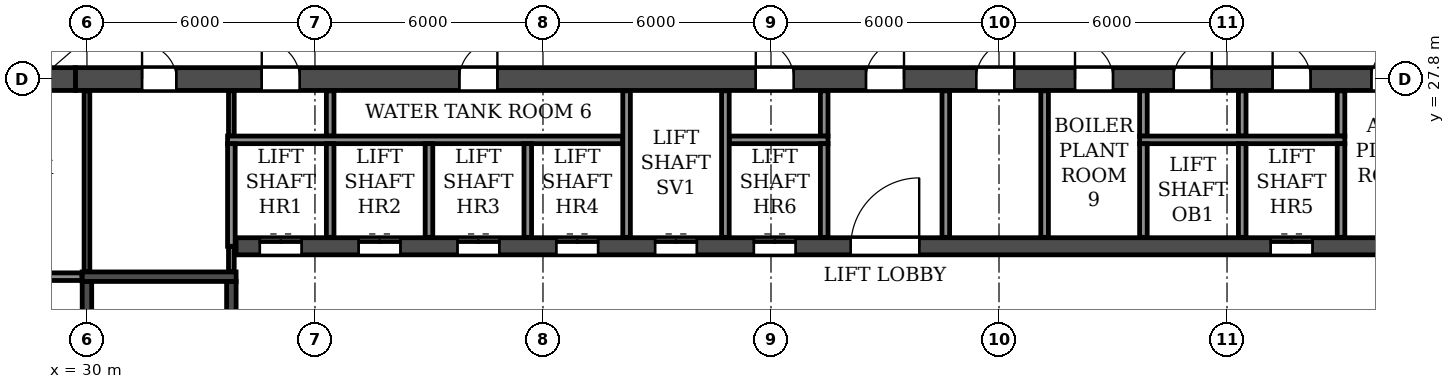
"""IFC4 building model, lengths in metres.
Left out: names, types, materials, properties, quantities, classifications, styles, units other than length and angle.
Written with IfcOpenShell. Run it as: python <this file> out.ifc"""

import sys

from ifc_helpers import new_model, si_unit, direction, frame, frame_2d, origin, place, context, subcontext, project, spatial, rectangle, extrude, element, fill, save


model = new_model("IFC4")
c1 = context("Model", 3, precision=1e-05, world=origin(), true_north=direction((0.0, 1.0)))
c2 = subcontext(c1, "Body", "Model", "MODEL_VIEW")
j1 = project(units=[si_unit("LENGTHUNIT", "METRE"), si_unit("PLANEANGLEUNIT", "RADIAN")], contexts=[c1])
p1 = place(None, origin())
s1 = spatial("IfcSite", under=j1, at=p1, CompositionType="ELEMENT")
p2 = place(p1, origin())
s2 = spatial("IfcBuilding", under=s1, at=p2, CompositionType="ELEMENT")
p3 = place(p2, frame((0.0, 0.0, 165.3)))
s3 = spatial("IfcBuildingStorey", under=s2, at=p3, CompositionType="ELEMENT", Elevation=165.3)
p4 = place(p3, frame((24.9, 27.8, 0.0), z_axis=(0.0, 0.0, 1.0), x_axis=(1.0, 0.0, 0.0)))
e1 = element("IfcWall", 1, at=p4, inside=s3, PredefinedType="SHEAR", context=c2, shape_type="SweptSolid", body=[
    extrude(rectangle(XDim=4.8, YDim=0.6, at=frame_2d((2.4, 0.0))), origin(), (0.0, 0.0, 1.0), 6.38),
])
p5 = place(p4, frame((1.9, 0.0, 0.0)))
e2 = element("IfcOpeningElement", 2, at=p5, cuts=e1, PredefinedType="OPENING", context=c2, shape_type="SweptSolid", body=[
    extrude(rectangle(XDim=1.0, YDim=2.1, at=frame_2d((0.5, 1.05))), frame((0.0, 0.31, 0.0), z_axis=(0.0, -1.0, 0.0), x_axis=(1.0, 0.0, 0.0)), (0.0, 0.0, 1.0), 0.62),
])
p6 = place(p3, frame((29.7, 27.8, 0.0), z_axis=(0.0, 0.0, 1.0), x_axis=(1.0, 0.0, 0.0)))
e3 = element("IfcWall", 3, at=p6, inside=s3, PredefinedType="SOLIDWALL", context=c2, shape_type="SweptSolid", body=[
    extrude(rectangle(XDim=42.6, YDim=0.6, at=frame_2d((21.3, 0.0))), origin(), (0.0, 0.0, 1.0), 6.38),
])
p7 = place(p6, frame((1.75, 0.0, 0.0)))
e4 = element("IfcOpeningElement", 4, at=p7, cuts=e3, PredefinedType="OPENING", context=c2, shape_type="SweptSolid", body=[
    extrude(rectangle(XDim=0.9, YDim=2.1, at=frame_2d((0.45, 1.05))), frame((0.0, 0.31, 0.0), z_axis=(0.0, -1.0, 0.0), x_axis=(1.0, 0.0, 0.0)), (0.0, 0.0, 1.0), 0.62),
])
p8 = place(p6, frame((4.9, 0.0, 0.0)))
e5 = element("IfcOpeningElement", 5, at=p8, cuts=e3, PredefinedType="OPENING", context=c2, shape_type="SweptSolid", body=[
    extrude(rectangle(XDim=1.0, YDim=2.1, at=frame_2d((0.5, 1.05))), frame((0.0, 0.31, 0.0), z_axis=(0.0, -1.0, 0.0), x_axis=(1.0, 0.0, 0.0)), (0.0, 0.0, 1.0), 0.62),
])
p9 = place(p6, frame((10.1, 0.0, 0.0)))
e6 = element("IfcOpeningElement", 6, at=p9, cuts=e3, PredefinedType="OPENING", context=c2, shape_type="SweptSolid", body=[
    extrude(rectangle(XDim=1.0, YDim=2.1, at=frame_2d((0.5, 1.05))), frame((0.0, 0.31, 0.0), z_axis=(0.0, -1.0, 0.0), x_axis=(1.0, 0.0, 0.0)), (0.0, 0.0, 1.0), 0.62),
])
p10 = place(p6, frame((17.9, 0.0, 0.0)))
e7 = element("IfcOpeningElement", 7, at=p10, cuts=e3, PredefinedType="OPENING", context=c2, shape_type="SweptSolid", body=[
    extrude(rectangle(XDim=1.0, YDim=2.1, at=frame_2d((0.5, 1.05))), frame((0.0, 0.31, 0.0), z_axis=(0.0, -1.0, 0.0), x_axis=(1.0, 0.0, 0.0)), (0.0, 0.0, 1.0), 0.62),
])
p11 = place(p6, frame((20.8, 0.0, 0.0)))
e8 = element("IfcOpeningElement", 8, at=p11, cuts=e3, PredefinedType="OPENING", context=c2, shape_type="SweptSolid", body=[
    extrude(rectangle(XDim=1.0, YDim=2.1, at=frame_2d((0.5, 1.05))), frame((0.0, 0.31, 0.0), z_axis=(0.0, -1.0, 0.0), x_axis=(1.0, 0.0, 0.0)), (0.0, 0.0, 1.0), 0.62),
])
p12 = place(p6, frame((23.7, 0.0, 0.0)))
e9 = element("IfcOpeningElement", 9, at=p12, cuts=e3, PredefinedType="OPENING", context=c2, shape_type="SweptSolid", body=[
    extrude(rectangle(XDim=1.0, YDim=2.1, at=frame_2d((0.5, 1.05))), frame((0.0, 0.31, 0.0), z_axis=(0.0, -1.0, 0.0), x_axis=(1.0, 0.0, 0.0)), (0.0, 0.0, 1.0), 0.62),
])
p13 = place(p6, frame((26.3, 0.0, 0.0)))
e10 = element("IfcOpeningElement", 10, at=p13, cuts=e3, PredefinedType="OPENING", context=c2, shape_type="SweptSolid", body=[
    extrude(rectangle(XDim=1.0, YDim=2.1, at=frame_2d((0.5, 1.05))), frame((0.0, 0.31, 0.0), z_axis=(0.0, -1.0, 0.0), x_axis=(1.0, 0.0, 0.0)), (0.0, 0.0, 1.0), 0.62),
])
p14 = place(p6, frame((28.9, 0.0, 0.0)))
e11 = element("IfcOpeningElement", 11, at=p14, cuts=e3, PredefinedType="OPENING", context=c2, shape_type="SweptSolid", body=[
    extrude(rectangle(XDim=1.0, YDim=2.1, at=frame_2d((0.5, 1.05))), frame((0.0, 0.31, 0.0), z_axis=(0.0, -1.0, 0.0), x_axis=(1.0, 0.0, 0.0)), (0.0, 0.0, 1.0), 0.62),
])
p15 = place(p6, frame((31.5, 0.0, 0.0)))
e12 = element("IfcOpeningElement", 12, at=p15, cuts=e3, PredefinedType="OPENING", context=c2, shape_type="SweptSolid", body=[
    extrude(rectangle(XDim=1.0, YDim=2.1, at=frame_2d((0.5, 1.05))), frame((0.0, 0.31, 0.0), z_axis=(0.0, -1.0, 0.0), x_axis=(1.0, 0.0, 0.0)), (0.0, 0.0, 1.0), 0.62),
])
p16 = place(p6, frame((34.1, 0.0, 0.0)))
e13 = element("IfcOpeningElement", 13, at=p16, cuts=e3, PredefinedType="OPENING", context=c2, shape_type="SweptSolid", body=[
    extrude(rectangle(XDim=1.0, YDim=2.1, at=frame_2d((0.5, 1.05))), frame((0.0, 0.31, 0.0), z_axis=(0.0, -1.0, 0.0), x_axis=(1.0, 0.0, 0.0)), (0.0, 0.0, 1.0), 0.62),
])
p17 = place(p6, frame((36.7, 0.0, 0.0)))
e14 = element("IfcOpeningElement", 14, at=p17, cuts=e3, PredefinedType="OPENING", context=c2, shape_type="SweptSolid", body=[
    extrude(rectangle(XDim=1.0, YDim=2.1, at=frame_2d((0.5, 1.05))), frame((0.0, 0.31, 0.0), z_axis=(0.0, -1.0, 0.0), x_axis=(1.0, 0.0, 0.0)), (0.0, 0.0, 1.0), 0.62),
])
p18 = place(p6, frame((39.95, 0.0, 0.0)))
e15 = element("IfcOpeningElement", 15, at=p18, cuts=e3, PredefinedType="OPENING", context=c2, shape_type="SweptSolid", body=[
    extrude(rectangle(XDim=0.9, YDim=2.1, at=frame_2d((0.45, 1.05))), frame((0.0, 0.31, 0.0), z_axis=(0.0, -1.0, 0.0), x_axis=(1.0, 0.0, 0.0)), (0.0, 0.0, 1.0), 0.62),
])
p19 = place(p3, frame((33.925, 23.4, 0.0), z_axis=(0.0, 0.0, 1.0), x_axis=(1.0, 0.0, 0.0)))
e16 = element("IfcWall", 16, at=p19, inside=s3, PredefinedType="SOLIDWALL", context=c2, shape_type="SweptSolid", body=[
    extrude(rectangle(XDim=34.15, YDim=0.45, at=frame_2d((17.075, 0.0))), origin(), (0.0, 0.0, 1.0), 6.38),
])
p20 = place(p19, frame((16.175, 0.0, 0.0)))
e17 = element("IfcOpeningElement", 17, at=p20, cuts=e16, PredefinedType="OPENING", context=c2, shape_type="SweptSolid", body=[
    extrude(rectangle(XDim=1.8, YDim=2.1, at=frame_2d((0.9, 1.05))), frame((0.0, 0.235, 0.0), z_axis=(0.0, -1.0, 0.0), x_axis=(1.0, 0.0, 0.0)), (0.0, 0.0, 1.0), 0.47),
])
p21 = place(p19, frame((0.625, 0.0, 0.0)))
e18 = element("IfcOpeningElement", 18, at=p21, cuts=e16, PredefinedType="OPENING", context=c2, shape_type="SweptSolid", body=[
    extrude(rectangle(XDim=1.1, YDim=2.1, at=frame_2d((0.55, 1.05))), frame((0.0, 0.235, 0.0), z_axis=(0.0, -1.0, 0.0), x_axis=(1.0, 0.0, 0.0)), (0.0, 0.0, 1.0), 0.47),
])
p22 = place(p19, frame((3.225, 0.0, 0.0)))
e19 = element("IfcOpeningElement", 19, at=p22, cuts=e16, PredefinedType="OPENING", context=c2, shape_type="SweptSolid", body=[
    extrude(rectangle(XDim=1.1, YDim=2.1, at=frame_2d((0.55, 1.05))), frame((0.0, 0.235, 0.0), z_axis=(0.0, -1.0, 0.0), x_axis=(1.0, 0.0, 0.0)), (0.0, 0.0, 1.0), 0.47),
])
p23 = place(p19, frame((5.825, 0.0, 0.0)))
e20 = element("IfcOpeningElement", 20, at=p23, cuts=e16, PredefinedType="OPENING", context=c2, shape_type="SweptSolid", body=[
    extrude(rectangle(XDim=1.1, YDim=2.1, at=frame_2d((0.55, 1.05))), frame((0.0, 0.235, 0.0), z_axis=(0.0, -1.0, 0.0), x_axis=(1.0, 0.0, 0.0)), (0.0, 0.0, 1.0), 0.47),
])
p24 = place(p19, frame((8.425, 0.0, 0.0)))
e21 = element("IfcOpeningElement", 21, at=p24, cuts=e16, PredefinedType="OPENING", context=c2, shape_type="SweptSolid", body=[
    extrude(rectangle(XDim=1.1, YDim=2.1, at=frame_2d((0.55, 1.05))), frame((0.0, 0.235, 0.0), z_axis=(0.0, -1.0, 0.0), x_axis=(1.0, 0.0, 0.0)), (0.0, 0.0, 1.0), 0.47),
])
p25 = place(p19, frame((11.025, 0.0, 0.0)))
e22 = element("IfcOpeningElement", 22, at=p25, cuts=e16, PredefinedType="OPENING", context=c2, shape_type="SweptSolid", body=[
    extrude(rectangle(XDim=1.1, YDim=2.1, at=frame_2d((0.55, 1.05))), frame((0.0, 0.235, 0.0), z_axis=(0.0, -1.0, 0.0), x_axis=(1.0, 0.0, 0.0)), (0.0, 0.0, 1.0), 0.47),
])
p26 = place(p19, frame((13.625, 0.0, 0.0)))
e23 = element("IfcOpeningElement", 23, at=p26, cuts=e16, PredefinedType="OPENING", context=c2, shape_type="SweptSolid", body=[
    extrude(rectangle(XDim=1.1, YDim=2.1, at=frame_2d((0.55, 1.05))), frame((0.0, 0.235, 0.0), z_axis=(0.0, -1.0, 0.0), x_axis=(1.0, 0.0, 0.0)), (0.0, 0.0, 1.0), 0.47),
])
p27 = place(p19, frame((27.225, 0.0, 0.0)))
e24 = element("IfcOpeningElement", 24, at=p27, cuts=e16, PredefinedType="OPENING", context=c2, shape_type="SweptSolid", body=[
    extrude(rectangle(XDim=1.1, YDim=2.1, at=frame_2d((0.55, 1.05))), frame((0.0, 0.235, 0.0), z_axis=(0.0, -1.0, 0.0), x_axis=(1.0, 0.0, 0.0)), (0.0, 0.0, 1.0), 0.47),
])
p28 = place(p3, frame((30.0, 14.825, 0.0), z_axis=(0.0, 0.0, 1.0), x_axis=(0.0, 1.0, 0.0)))
e25 = element("IfcWall", 25, at=p28, inside=s3, PredefinedType="SOLIDWALL", context=c2, shape_type="SweptSolid", body=[
    extrude(rectangle(XDim=7.65, YDim=0.25, at=frame_2d((3.825, 0.0))), origin(), (0.0, 0.0, 1.0), 6.38),
])
p29 = place(p3, frame((33.8, 14.825, 0.0), z_axis=(0.0, 0.0, 1.0), x_axis=(0.0, 1.0, 0.0)))
e26 = element("IfcWall", 26, at=p29, inside=s3, PredefinedType="SOLIDWALL", context=c2, shape_type="SweptSolid", body=[
    extrude(rectangle(XDim=7.65, YDim=0.25, at=frame_2d((3.825, 0.0))), origin(), (0.0, 0.0, 1.0), 6.38),
])
p30 = place(p29, frame((0.475, 0.0, 0.0)))
e27 = element("IfcOpeningElement", 27, at=p30, cuts=e26, PredefinedType="OPENING", context=c2, shape_type="SweptSolid", body=[
    extrude(rectangle(XDim=1.0, YDim=2.1, at=frame_2d((0.5, 1.05))), frame((0.0, 0.135, 0.0), z_axis=(0.0, -1.0, 0.0), x_axis=(1.0, 0.0, 0.0)), (0.0, 0.0, 1.0), 0.27),
])
p31 = place(p3, frame((29.875, 22.6, 0.0), z_axis=(0.0, 0.0, 1.0), x_axis=(1.0, 0.0, 0.0)))
e28 = element("IfcWall", 28, at=p31, inside=s3, PredefinedType="SOLIDWALL", context=c2, shape_type="SweptSolid", body=[
    extrude(rectangle(XDim=4.05, YDim=0.25, at=frame_2d((2.025, 0.0))), origin(), (0.0, 0.0, 1.0), 6.38),
])
for number, where, z_axis, x_axis in (
    (29, (36.4, 26.3, 0.0), (0.0, 0.0, 1.0), (0.0, 1.0, 0.0)),
    (30, (49.4, 26.3, 0.0), (0.0, 0.0, 1.0), (0.0, 1.0, 0.0)),
):
    element("IfcWall", number, at=place(p3, frame(where, z_axis=z_axis, x_axis=x_axis)), inside=s3, PredefinedType="PARTITIONING", context=c2, shape_type="SweptSolid", body=[
        extrude(rectangle(XDim=1.19, YDim=0.2, at=frame_2d((0.595, 0.0))), origin(), (0.0, 0.0, 1.0), 6.38),
    ])
for number, where, z_axis, x_axis in (
    (31, (52.6, 23.635, 0.0), (0.0, 0.0, 1.0), (0.0, 1.0, 0.0)),
    (32, (55.2, 23.635, 0.0), (0.0, 0.0, 1.0), (0.0, 1.0, 0.0)),
):
    element("IfcWall", number, at=place(p3, frame(where, z_axis=z_axis, x_axis=x_axis)), inside=s3, PredefinedType="PARTITIONING", context=c2, shape_type="SweptSolid", body=[
        extrude(rectangle(XDim=3.855, YDim=0.2, at=frame_2d((1.927, 0.0))), origin(), (0.0, 0.0, 1.0), 6.38),
    ])
for number, where, z_axis, x_axis in (
    (33, (57.8, 26.3, 0.0), (0.0, 0.0, 1.0), (0.0, 1.0, 0.0)),
    (34, (60.4, 26.3, 0.0), (0.0, 0.0, 1.0), (0.0, 1.0, 0.0)),
    (35, (63.0, 26.3, 0.0), (0.0, 0.0, 1.0), (0.0, 1.0, 0.0)),
):
    element("IfcWall", number, at=place(p3, frame(where, z_axis=z_axis, x_axis=x_axis)), inside=s3, PredefinedType="PARTITIONING", context=c2, shape_type="SweptSolid", body=[
        extrude(rectangle(XDim=1.19, YDim=0.2, at=frame_2d((0.595, 0.0))), origin(), (0.0, 0.0, 1.0), 6.38),
    ])
p32 = place(p3, frame((24.735, 22.6, 0.0), z_axis=(0.0, 0.0, 1.0), x_axis=(1.0, 0.0, 0.0)))
e36 = element("IfcWall", 36, at=p32, inside=s3, PredefinedType="PARTITIONING", context=c2, shape_type="SweptSolid", body=[
    extrude(rectangle(XDim=5.13, YDim=0.2, at=frame_2d((2.565, 0.0))), origin(), (0.0, 0.0, 1.0), 6.38),
])
p33 = place(p3, frame((30.0, 22.735, 0.0), z_axis=(0.0, 0.0, 1.0), x_axis=(0.0, 1.0, 0.0)))
e37 = element("IfcWall", 37, at=p33, inside=s3, PredefinedType="PARTITIONING", context=c2, shape_type="SweptSolid", body=[
    extrude(rectangle(XDim=4.755, YDim=0.15, at=frame_2d((2.377, 0.0))), origin(), (0.0, 0.0, 1.0), 6.38),
])
p34 = place(p3, frame((33.8, 22.735, 0.0), z_axis=(0.0, 0.0, 1.0), x_axis=(0.0, 1.0, 0.0)))
e38 = element("IfcWall", 38, at=p34, inside=s3, PredefinedType="PARTITIONING", context=c2, shape_type="SweptSolid", body=[
    extrude(rectangle(XDim=0.665, YDim=0.15, at=frame_2d((0.333, 0.0))), origin(), (0.0, 0.0, 1.0), 6.38),
])
p35 = place(p3, frame((33.8, 26.3, 0.0), z_axis=(0.0, 0.0, 1.0), x_axis=(0.0, 1.0, 0.0)))
e39 = element("IfcWall", 39, at=p35, inside=s3, PredefinedType="PARTITIONING", context=c2, shape_type="SweptSolid", body=[
    extrude(rectangle(XDim=1.19, YDim=0.15, at=frame_2d((0.595, 0.0))), origin(), (0.0, 0.0, 1.0), 6.38),
])
p36 = place(p3, frame((33.7, 26.2, 0.0), z_axis=(0.0, 0.0, 1.0), x_axis=(1.0, 0.0, 0.0)))
e40 = element("IfcWall", 40, at=p36, inside=s3, PredefinedType="PARTITIONING", context=c2, shape_type="SweptSolid", body=[
    extrude(rectangle(XDim=10.4, YDim=0.2, at=frame_2d((5.2, 0.0))), origin(), (0.0, 0.0, 1.0), 6.38),
])
p37 = place(p3, frame((46.9, 26.2, 0.0), z_axis=(0.0, 0.0, 1.0), x_axis=(1.0, 0.0, 0.0)))
e41 = element("IfcWall", 41, at=p37, inside=s3, PredefinedType="PARTITIONING", context=c2, shape_type="SweptSolid", body=[
    extrude(rectangle(XDim=2.6, YDim=0.2, at=frame_2d((1.3, 0.0))), origin(), (0.0, 0.0, 1.0), 6.38),
])
p38 = place(p3, frame((57.7, 26.2, 0.0), z_axis=(0.0, 0.0, 1.0), x_axis=(1.0, 0.0, 0.0)))
e42 = element("IfcWall", 42, at=p38, inside=s3, PredefinedType="PARTITIONING", context=c2, shape_type="SweptSolid", body=[
    extrude(rectangle(XDim=5.4, YDim=0.2, at=frame_2d((2.7, 0.0))), origin(), (0.0, 0.0, 1.0), 6.38),
])
p39 = place(p3, frame((33.8, 23.4, 0.0), z_axis=(0.0, 0.0, 1.0), x_axis=(0.0, 1.0, 0.0)))
e43 = element("IfcWall", 43, at=p39, inside=s3, PredefinedType="PARTITIONING", context=c2, shape_type="SweptSolid", body=[
    extrude(rectangle(XDim=2.7, YDim=0.2, at=frame_2d((1.35, 0.0))), origin(), (0.0, 0.0, 1.0), 6.38),
])
for number, where, z_axis, x_axis in (
    (44, (36.4, 23.635, 0.0), (0.0, 0.0, 1.0), (0.0, 1.0, 0.0)),
    (45, (39.0, 23.635, 0.0), (0.0, 0.0, 1.0), (0.0, 1.0, 0.0)),
    (46, (41.6, 23.635, 0.0), (0.0, 0.0, 1.0), (0.0, 1.0, 0.0)),
):
    element("IfcWall", number, at=place(p3, frame(where, z_axis=z_axis, x_axis=x_axis)), inside=s3, PredefinedType="PARTITIONING", context=c2, shape_type="SweptSolid", body=[
        extrude(rectangle(XDim=2.465, YDim=0.2, at=frame_2d((1.232, 0.0))), origin(), (0.0, 0.0, 1.0), 6.38),
    ])
for number, where, z_axis, x_axis in (
    (47, (44.2, 23.635, 0.0), (0.0, 0.0, 1.0), (0.0, 1.0, 0.0)),
    (48, (46.8, 23.635, 0.0), (0.0, 0.0, 1.0), (0.0, 1.0, 0.0)),
):
    element("IfcWall", number, at=place(p3, frame(where, z_axis=z_axis, x_axis=x_axis)), inside=s3, PredefinedType="PARTITIONING", context=c2, shape_type="SweptSolid", body=[
        extrude(rectangle(XDim=3.855, YDim=0.2, at=frame_2d((1.927, 0.0))), origin(), (0.0, 0.0, 1.0), 6.38),
    ])
for number, where, z_axis, x_axis in (
    (49, (49.4, 23.635, 0.0), (0.0, 0.0, 1.0), (0.0, 1.0, 0.0)),
    (50, (57.8, 23.635, 0.0), (0.0, 0.0, 1.0), (0.0, 1.0, 0.0)),
    (51, (60.4, 23.635, 0.0), (0.0, 0.0, 1.0), (0.0, 1.0, 0.0)),
    (52, (63.0, 23.635, 0.0), (0.0, 0.0, 1.0), (0.0, 1.0, 0.0)),
):
    element("IfcWall", number, at=place(p3, frame(where, z_axis=z_axis, x_axis=x_axis)), inside=s3, PredefinedType="PARTITIONING", context=c2, shape_type="SweptSolid", body=[
        extrude(rectangle(XDim=2.465, YDim=0.2, at=frame_2d((1.232, 0.0))), origin(), (0.0, 0.0, 1.0), 6.38),
    ])
p40 = place(p7, origin())
e53 = element("IfcDoor", 53, at=p40, inside=s3, OperationType="SINGLE_SWING_LEFT", PredefinedType="DOOR", context=c2, shape_type="SweptSolid", body=[
    extrude(rectangle(XDim=0.9, YDim=2.1, at=frame_2d((0.45, 1.05))), frame((0.0, 0.025, 0.0), z_axis=(0.0, -1.0, 0.0), x_axis=(1.0, 0.0, 0.0)), (0.0, 0.0, 1.0), 0.05),
])
fill(e4, e53)
p41 = place(p8, origin())
e54 = element("IfcDoor", 54, at=p41, inside=s3, OperationType="SINGLE_SWING_LEFT", PredefinedType="DOOR", context=c2, shape_type="SweptSolid", body=[
    extrude(rectangle(XDim=1.0, YDim=2.1, at=frame_2d((0.5, 1.05))), frame((0.0, 0.025, 0.0), z_axis=(0.0, -1.0, 0.0), x_axis=(1.0, 0.0, 0.0)), (0.0, 0.0, 1.0), 0.05),
])
fill(e5, e54)
p42 = place(p9, origin())
e55 = element("IfcDoor", 55, at=p42, inside=s3, OperationType="SINGLE_SWING_RIGHT", PredefinedType="DOOR", context=c2, shape_type="SweptSolid", body=[
    extrude(rectangle(XDim=1.0, YDim=2.1, at=frame_2d((0.5, 1.05))), frame((0.0, 0.025, 0.0), z_axis=(0.0, -1.0, 0.0), x_axis=(1.0, 0.0, 0.0)), (0.0, 0.0, 1.0), 0.05),
])
fill(e6, e55)
p43 = place(p10, origin())
e56 = element("IfcDoor", 56, at=p43, inside=s3, OperationType="SINGLE_SWING_LEFT", PredefinedType="DOOR", context=c2, shape_type="SweptSolid", body=[
    extrude(rectangle(XDim=1.0, YDim=2.1, at=frame_2d((0.5, 1.05))), frame((0.0, 0.025, 0.0), z_axis=(0.0, -1.0, 0.0), x_axis=(1.0, 0.0, 0.0)), (0.0, 0.0, 1.0), 0.05),
])
fill(e7, e56)
p44 = place(p11, origin())
e57 = element("IfcDoor", 57, at=p44, inside=s3, OperationType="SINGLE_SWING_RIGHT", PredefinedType="DOOR", context=c2, shape_type="SweptSolid", body=[
    extrude(rectangle(XDim=1.0, YDim=2.1, at=frame_2d((0.5, 1.05))), frame((0.0, 0.025, 0.0), z_axis=(0.0, -1.0, 0.0), x_axis=(1.0, 0.0, 0.0)), (0.0, 0.0, 1.0), 0.05),
])
fill(e8, e57)
p45 = place(p12, origin())
e58 = element("IfcDoor", 58, at=p45, inside=s3, OperationType="SINGLE_SWING_RIGHT", PredefinedType="DOOR", context=c2, shape_type="SweptSolid", body=[
    extrude(rectangle(XDim=1.0, YDim=2.1, at=frame_2d((0.5, 1.05))), frame((0.0, 0.025, 0.0), z_axis=(0.0, -1.0, 0.0), x_axis=(1.0, 0.0, 0.0)), (0.0, 0.0, 1.0), 0.05),
])
fill(e9, e58)
p46 = place(p13, origin())
e59 = element("IfcDoor", 59, at=p46, inside=s3, OperationType="SINGLE_SWING_LEFT", PredefinedType="DOOR", context=c2, shape_type="SweptSolid", body=[
    extrude(rectangle(XDim=1.0, YDim=2.1, at=frame_2d((0.5, 1.05))), frame((0.0, 0.025, 0.0), z_axis=(0.0, -1.0, 0.0), x_axis=(1.0, 0.0, 0.0)), (0.0, 0.0, 1.0), 0.05),
])
fill(e10, e59)
p47 = place(p14, origin())
e60 = element("IfcDoor", 60, at=p47, inside=s3, OperationType="SINGLE_SWING_RIGHT", PredefinedType="DOOR", context=c2, shape_type="SweptSolid", body=[
    extrude(rectangle(XDim=1.0, YDim=2.1, at=frame_2d((0.5, 1.05))), frame((0.0, 0.025, 0.0), z_axis=(0.0, -1.0, 0.0), x_axis=(1.0, 0.0, 0.0)), (0.0, 0.0, 1.0), 0.05),
])
fill(e11, e60)
p48 = place(p15, origin())
e61 = element("IfcDoor", 61, at=p48, inside=s3, OperationType="SINGLE_SWING_LEFT", PredefinedType="DOOR", context=c2, shape_type="SweptSolid", body=[
    extrude(rectangle(XDim=1.0, YDim=2.1, at=frame_2d((0.5, 1.05))), frame((0.0, 0.025, 0.0), z_axis=(0.0, -1.0, 0.0), x_axis=(1.0, 0.0, 0.0)), (0.0, 0.0, 1.0), 0.05),
])
fill(e12, e61)
p49 = place(p16, origin())
e62 = element("IfcDoor", 62, at=p49, inside=s3, OperationType="SINGLE_SWING_RIGHT", PredefinedType="DOOR", context=c2, shape_type="SweptSolid", body=[
    extrude(rectangle(XDim=1.0, YDim=2.1, at=frame_2d((0.5, 1.05))), frame((0.0, 0.025, 0.0), z_axis=(0.0, -1.0, 0.0), x_axis=(1.0, 0.0, 0.0)), (0.0, 0.0, 1.0), 0.05),
])
fill(e13, e62)
p50 = place(p20, origin())
e63 = element("IfcDoor", 63, at=p50, inside=s3, OperationType="DOUBLE_DOOR_SINGLE_SWING", PredefinedType="DOOR", context=c2, shape_type="SweptSolid", body=[
    extrude(rectangle(XDim=1.8, YDim=2.1, at=frame_2d((0.9, 1.05))), frame((0.0, 0.025, 0.0), z_axis=(0.0, -1.0, 0.0), x_axis=(1.0, 0.0, 0.0)), (0.0, 0.0, 1.0), 0.05),
])
fill(e17, e63)
p51 = place(p21, origin())
e64 = element("IfcDoor", 64, at=p51, inside=s3, OperationType="DOUBLE_DOOR_SLIDING", PredefinedType="DOOR", context=c2, shape_type="SweptSolid", body=[
    extrude(rectangle(XDim=1.1, YDim=2.1, at=frame_2d((0.55, 1.05))), frame((0.0, 0.025, 0.0), z_axis=(0.0, -1.0, 0.0), x_axis=(1.0, 0.0, 0.0)), (0.0, 0.0, 1.0), 0.05),
])
fill(e18, e64)
p52 = place(p22, origin())
e65 = element("IfcDoor", 65, at=p52, inside=s3, OperationType="DOUBLE_DOOR_SLIDING", PredefinedType="DOOR", context=c2, shape_type="SweptSolid", body=[
    extrude(rectangle(XDim=1.1, YDim=2.1, at=frame_2d((0.55, 1.05))), frame((0.0, 0.025, 0.0), z_axis=(0.0, -1.0, 0.0), x_axis=(1.0, 0.0, 0.0)), (0.0, 0.0, 1.0), 0.05),
])
fill(e19, e65)
p53 = place(p23, origin())
e66 = element("IfcDoor", 66, at=p53, inside=s3, OperationType="DOUBLE_DOOR_SLIDING", PredefinedType="DOOR", context=c2, shape_type="SweptSolid", body=[
    extrude(rectangle(XDim=1.1, YDim=2.1, at=frame_2d((0.55, 1.05))), frame((0.0, 0.025, 0.0), z_axis=(0.0, -1.0, 0.0), x_axis=(1.0, 0.0, 0.0)), (0.0, 0.0, 1.0), 0.05),
])
fill(e20, e66)
p54 = place(p24, origin())
e67 = element("IfcDoor", 67, at=p54, inside=s3, OperationType="DOUBLE_DOOR_SLIDING", PredefinedType="DOOR", context=c2, shape_type="SweptSolid", body=[
    extrude(rectangle(XDim=1.1, YDim=2.1, at=frame_2d((0.55, 1.05))), frame((0.0, 0.025, 0.0), z_axis=(0.0, -1.0, 0.0), x_axis=(1.0, 0.0, 0.0)), (0.0, 0.0, 1.0), 0.05),
])
fill(e21, e67)
p55 = place(p25, origin())
e68 = element("IfcDoor", 68, at=p55, inside=s3, OperationType="DOUBLE_DOOR_SLIDING", PredefinedType="DOOR", context=c2, shape_type="SweptSolid", body=[
    extrude(rectangle(XDim=1.1, YDim=2.1, at=frame_2d((0.55, 1.05))), frame((0.0, 0.025, 0.0), z_axis=(0.0, -1.0, 0.0), x_axis=(1.0, 0.0, 0.0)), (0.0, 0.0, 1.0), 0.05),
])
fill(e22, e68)
p56 = place(p26, origin())
e69 = element("IfcDoor", 69, at=p56, inside=s3, OperationType="DOUBLE_DOOR_SLIDING", PredefinedType="DOOR", context=c2, shape_type="SweptSolid", body=[
    extrude(rectangle(XDim=1.1, YDim=2.1, at=frame_2d((0.55, 1.05))), frame((0.0, 0.025, 0.0), z_axis=(0.0, -1.0, 0.0), x_axis=(1.0, 0.0, 0.0)), (0.0, 0.0, 1.0), 0.05),
])
fill(e23, e69)
p57 = place(p27, origin())
e70 = element("IfcDoor", 70, at=p57, inside=s3, OperationType="DOUBLE_DOOR_SLIDING", PredefinedType="DOOR", context=c2, shape_type="SweptSolid", body=[
    extrude(rectangle(XDim=1.1, YDim=2.1, at=frame_2d((0.55, 1.05))), frame((0.0, 0.025, 0.0), z_axis=(0.0, -1.0, 0.0), x_axis=(1.0, 0.0, 0.0)), (0.0, 0.0, 1.0), 0.05),
])
fill(e24, e70)
save(model, sys.argv[1])
